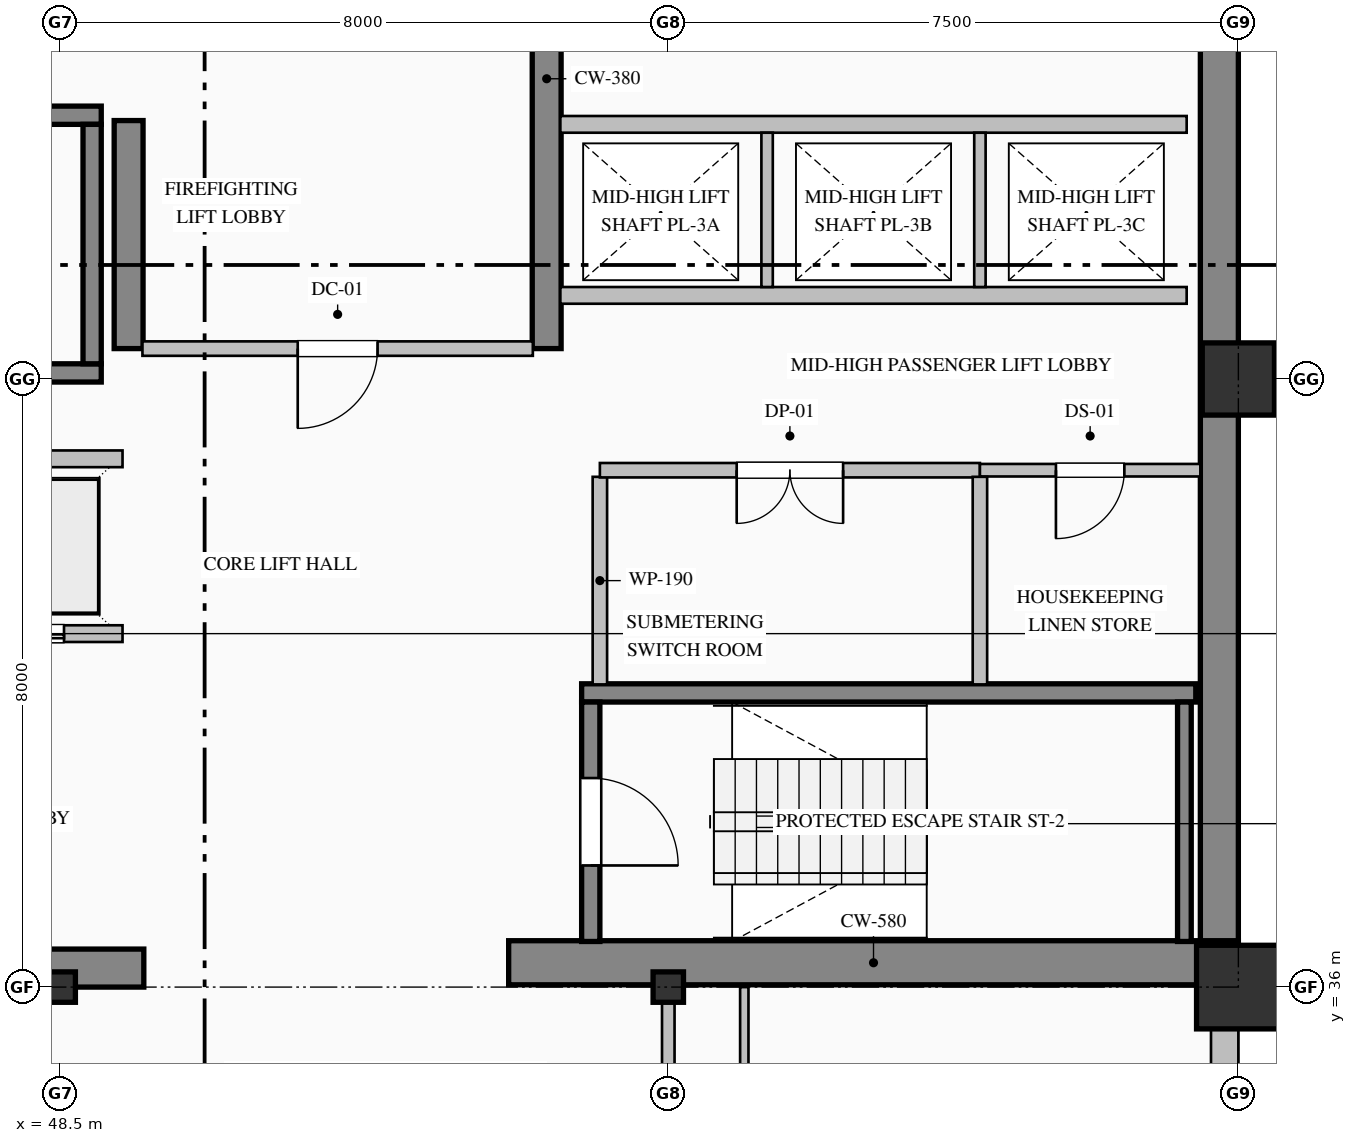
"""IFC4 building model, lengths in metres.
Left out: names, types, materials, properties, quantities, classifications, styles, units other than length and angle.
Written with IfcOpenShell. Run it as: python <this file> out.ifc"""

import sys

from ifc_helpers import new_model, si_unit, direction, frame, frame_2d, origin, origin_2d, place, context, subcontext, project, spatial, rectangle, hollow_rectangle, i_section, extrude, element, fill, save


model = new_model("IFC4")
c1 = context("Model", 3, precision=1e-05, world=origin(), true_north=direction((0.0, 1.0)))
c2 = subcontext(c1, "Body", "Model", "MODEL_VIEW")
j1 = project(units=[si_unit("LENGTHUNIT", "METRE"), si_unit("PLANEANGLEUNIT", "RADIAN")], contexts=[c1])
p1 = place(None, origin())
s1 = spatial("IfcSite", under=j1, at=p1, CompositionType="ELEMENT")
p2 = place(p1, origin())
s2 = spatial("IfcBuilding", under=s1, at=p2, CompositionType="ELEMENT")
p3 = place(p2, frame((0.0, 0.0, 163.0)))
s3 = spatial("IfcBuildingStorey", under=s2, at=p3, CompositionType="ELEMENT", Elevation=163.0)
p4 = place(p3, frame((63.75, 36.32, 0.0), z_axis=(0.0, 0.0, 1.0), x_axis=(0.0, 1.0, 0.0)))
e1 = element("IfcWall", 1, at=p4, inside=s3, PredefinedType="SHEAR", context=c2, shape_type="SweptSolid", body=[
    extrude(rectangle(XDim=15.18, YDim=0.5, at=frame_2d((7.59, 0.0))), origin(), (0.0, 0.0, 1.0), 3.765),
])
p5 = place(p3, frame((40.5, 36.25, 0.0), z_axis=(0.0, 0.0, 1.0), x_axis=(1.0, 0.0, 0.0)))
e2 = element("IfcWall", 2, at=p5, inside=s3, PredefinedType="SHEAR", context=c2, shape_type="SweptSolid", body=[
    extrude(rectangle(XDim=9.1, YDim=0.5, at=frame_2d((4.55, 0.0))), origin(), (0.0, 0.0, 1.0), 3.765),
])
p6 = place(p3, frame((54.4, 36.32, 0.0), z_axis=(0.0, 0.0, 1.0), x_axis=(1.0, 0.0, 0.0)))
e3 = element("IfcWall", 3, at=p6, inside=s3, PredefinedType="SHEAR", context=c2, shape_type="SweptSolid", body=[
    extrude(rectangle(XDim=9.6, YDim=0.58, at=frame_2d((4.8, 0.0))), origin(), (0.0, 0.0, 1.0), 4.0),
])
p7 = place(p3, frame((49.4, 44.4, 0.0), z_axis=(0.0, 0.0, 1.0), x_axis=(0.0, 1.0, 0.0)))
e4 = element("IfcWall", 4, at=p7, inside=s3, PredefinedType="SHEAR", context=c2, shape_type="SweptSolid", body=[
    extrude(rectangle(XDim=3.0, YDim=0.38, at=frame_2d((1.5, 0.0))), origin(), (0.0, 0.0, 1.0), 3.765),
])
p8 = place(p3, frame((54.9, 44.4, 0.0), z_axis=(0.0, 0.0, 1.0), x_axis=(0.0, 1.0, 0.0)))
e5 = element("IfcWall", 5, at=p8, inside=s3, PredefinedType="SHEAR", context=c2, shape_type="SweptSolid", body=[
    extrude(rectangle(XDim=7.1, YDim=0.38, at=frame_2d((3.55, 0.0))), origin(), (0.0, 0.0, 1.0), 3.765),
])
for number, where, z_axis, x_axis in (
    (6, (48.5, 36.0, 0.0), (0.0, 0.0, 1.0), (1.0, 0.0, 0.0)),
    (7, (56.5, 36.0, 0.0), (0.0, 0.0, 1.0), (1.0, 0.0, 0.0)),
):
    element("IfcColumn", number, at=place(p3, frame(where, z_axis=z_axis, x_axis=x_axis)), inside=s3, PredefinedType="COLUMN", context=c2, shape_type="SweptSolid", body=[
        extrude(i_section(OverallWidth=0.4, OverallDepth=0.4, WebThickness=0.013, FlangeThickness=0.021, FilletRadius=0.022, at=origin_2d()), origin(), (0.0, 0.0, 1.0), 4.0),
    ])
p9 = place(p3, frame((64.0, 36.0, 0.0), z_axis=(0.0, 0.0, 1.0), x_axis=(1.0, 0.0, 0.0)))
e8 = element("IfcColumn", 8, at=p9, inside=s3, PredefinedType="COLUMN", context=c2, shape_type="SweptSolid", body=[
    extrude(hollow_rectangle(XDim=1.1, YDim=1.1, WallThickness=0.04, at=origin_2d()), origin(), (0.0, 0.0, 1.0), 4.0),
])
p10 = place(p3, frame((64.0, 44.0, 0.0), z_axis=(0.0, 0.0, 1.0), x_axis=(1.0, 0.0, 0.0)))
e9 = element("IfcColumn", 9, at=p10, inside=s3, PredefinedType="COLUMN", context=c2, shape_type="SweptSolid", body=[
    extrude(hollow_rectangle(XDim=0.95, YDim=0.95, WallThickness=0.036, at=origin_2d()), origin(), (0.0, 0.0, 1.0), 4.0),
])
p11 = place(p3, frame((63.82, 36.05, 0.0), z_axis=(0.0, 0.0, 1.0), x_axis=(0.0, -1.0, 0.0)))
e10 = element("IfcWall", 10, at=p11, inside=s3, PredefinedType="SOLIDWALL", context=c2, shape_type="SweptSolid", body=[
    extrude(rectangle(XDim=28.05, YDim=0.36, at=frame_2d((14.025, 0.0))), origin(), (0.0, 0.0, 1.0), 3.265),
])
p12 = place(p11, frame((2.85, 0.0, 0.85)))
e11 = element("IfcOpeningElement", 11, at=p12, cuts=e10, PredefinedType="OPENING", context=c2, shape_type="SweptSolid", body=[
    extrude(rectangle(XDim=1.5, YDim=1.95, at=frame_2d((0.75, 0.975))), frame((0.0, 0.19, 0.0), z_axis=(0.0, -1.0, 0.0), x_axis=(1.0, 0.0, 0.0)), (0.0, 0.0, 1.0), 0.38),
])
p13 = place(p11, frame((10.2, 0.0, 0.7)))
e12 = element("IfcOpeningElement", 12, at=p13, cuts=e10, PredefinedType="OPENING", context=c2, shape_type="SweptSolid", body=[
    extrude(rectangle(XDim=1.2, YDim=1.85, at=frame_2d((0.6, 0.925))), frame((0.0, 0.19, 0.0), z_axis=(0.0, -1.0, 0.0), x_axis=(1.0, 0.0, 0.0)), (0.0, 0.0, 1.0), 0.38),
])
p14 = place(p11, frame((13.65, 0.0, 0.85)))
e13 = element("IfcOpeningElement", 13, at=p14, cuts=e10, PredefinedType="OPENING", context=c2, shape_type="SweptSolid", body=[
    extrude(rectangle(XDim=1.5, YDim=1.95, at=frame_2d((0.75, 0.975))), frame((0.0, 0.19, 0.0), z_axis=(0.0, -1.0, 0.0), x_axis=(1.0, 0.0, 0.0)), (0.0, 0.0, 1.0), 0.38),
])
p15 = place(p11, frame((24.45, 0.0, 0.85)))
e14 = element("IfcOpeningElement", 14, at=p15, cuts=e10, PredefinedType="OPENING", context=c2, shape_type="SweptSolid", body=[
    extrude(rectangle(XDim=1.5, YDim=1.95, at=frame_2d((0.75, 0.975))), frame((0.0, 0.19, 0.0), z_axis=(0.0, -1.0, 0.0), x_axis=(1.0, 0.0, 0.0)), (0.0, 0.0, 1.0), 0.38),
])
for number, where, z_axis, x_axis in (
    (15, (40.96, 47.47, 0.0), (0.0, 0.0, 1.0), (1.0, 0.0, 0.0)),
    (16, (49.04, 44.08, 0.0), (0.0, 0.0, 1.0), (-1.0, 0.0, 0.0)),
):
    element("IfcWall", number, at=place(p3, frame(where, z_axis=z_axis, x_axis=x_axis)), inside=s3, PredefinedType="SOLIDWALL", context=c2, shape_type="SweptSolid", body=[
        extrude(rectangle(XDim=8.08, YDim=0.24, at=frame_2d((4.04, 0.0))), origin(), (0.0, 0.0, 1.0), 4.0),
    ])
p16 = place(p3, frame((48.92, 44.2, 0.0), z_axis=(0.0, 0.0, 1.0), x_axis=(0.0, 1.0, 0.0)))
e17 = element("IfcWall", 17, at=p16, inside=s3, PredefinedType="SOLIDWALL", context=c2, shape_type="SweptSolid", body=[
    extrude(rectangle(XDim=3.15, YDim=0.24, at=frame_2d((1.575, 0.0))), origin(), (0.0, 0.0, 1.0), 4.0),
])
p17 = place(p3, frame((55.36, 39.87, 0.0), z_axis=(0.0, 0.0, 1.0), x_axis=(1.0, 0.0, 0.0)))
e18 = element("IfcWall", 18, at=p17, inside=s3, PredefinedType="SOLIDWALL", context=c2, shape_type="SweptSolid", body=[
    extrude(rectangle(XDim=8.08, YDim=0.24, at=frame_2d((4.04, 0.0))), origin(), (0.0, 0.0, 1.0), 4.0),
])
p18 = place(p3, frame((55.48, 39.75, 0.0), z_axis=(0.0, 0.0, 1.0), x_axis=(0.0, -1.0, 0.0)))
e19 = element("IfcWall", 19, at=p18, inside=s3, PredefinedType="SOLIDWALL", context=c2, shape_type="SweptSolid", body=[
    extrude(rectangle(XDim=3.15, YDim=0.24, at=frame_2d((1.575, 0.0))), origin(), (0.0, 0.0, 1.0), 4.0),
])
p19 = place(p18, frame((1.0, 0.0, 0.0)))
e20 = element("IfcOpeningElement", 20, at=p19, cuts=e19, PredefinedType="OPENING", context=c2, shape_type="SweptSolid", body=[
    extrude(rectangle(XDim=1.15, YDim=2.2, at=frame_2d((0.575, 1.1))), frame((0.0, 0.13, 0.0), z_axis=(0.0, -1.0, 0.0), x_axis=(1.0, 0.0, 0.0)), (0.0, 0.0, 1.0), 0.26),
])
p20 = place(p3, frame((63.29, 36.6, 0.0), z_axis=(0.0, 0.0, 1.0), x_axis=(0.0, 1.0, 0.0)))
e21 = element("IfcWall", 21, at=p20, inside=s3, PredefinedType="SOLIDWALL", context=c2, shape_type="SweptSolid", body=[
    extrude(rectangle(XDim=3.15, YDim=0.18, at=frame_2d((1.575, 0.0))), origin(), (0.0, 0.0, 1.0), 4.0),
])
p21 = place(p3, frame((49.32, 40.65, 0.0), z_axis=(0.0, 0.0, 1.0), x_axis=(-1.0, 0.0, 0.0)))
e22 = element("IfcWall", 22, at=p21, inside=s3, PredefinedType="PARTITIONING", context=c2, shape_type="SweptSolid", body=[
    extrude(rectangle(XDim=8.24, YDim=0.22, at=frame_2d((4.12, 0.0))), origin(), (0.0, 0.0, 1.0), 3.765),
])
p22 = place(p21, frame((6.37, 0.0, 0.0)))
e23 = element("IfcOpeningElement", 23, at=p22, cuts=e22, PredefinedType="OPENING", context=c2, shape_type="SweptSolid", body=[
    extrude(rectangle(XDim=1.1, YDim=2.2, at=frame_2d((0.55, 1.1))), frame((0.0, 0.12, 0.0), z_axis=(0.0, -1.0, 0.0), x_axis=(1.0, 0.0, 0.0)), (0.0, 0.0, 1.0), 0.24),
])
p23 = place(p21, frame((3.57, 0.0, 0.0)))
e24 = element("IfcOpeningElement", 24, at=p23, cuts=e22, PredefinedType="OPENING", context=c2, shape_type="SweptSolid", body=[
    extrude(rectangle(XDim=1.1, YDim=2.2, at=frame_2d((0.55, 1.1))), frame((0.0, 0.12, 0.0), z_axis=(0.0, -1.0, 0.0), x_axis=(1.0, 0.0, 0.0)), (0.0, 0.0, 1.0), 0.24),
])
p24 = place(p21, frame((0.77, 0.0, 0.0)))
e25 = element("IfcOpeningElement", 25, at=p24, cuts=e22, PredefinedType="OPENING", context=c2, shape_type="SweptSolid", body=[
    extrude(rectangle(XDim=1.1, YDim=2.2, at=frame_2d((0.55, 1.1))), frame((0.0, 0.12, 0.0), z_axis=(0.0, -1.0, 0.0), x_axis=(1.0, 0.0, 0.0)), (0.0, 0.0, 1.0), 0.24),
])
for number, where, z_axis, x_axis in (
    (26, (41.08, 42.95, 0.0), (0.0, 0.0, 1.0), (1.0, 0.0, 0.0)),
    (27, (63.32, 45.1, 0.0), (0.0, 0.0, 1.0), (-1.0, 0.0, 0.0)),
    (28, (55.08, 47.35, 0.0), (0.0, 0.0, 1.0), (1.0, 0.0, 0.0)),
):
    element("IfcWall", number, at=place(p3, frame(where, z_axis=z_axis, x_axis=x_axis)), inside=s3, PredefinedType="PARTITIONING", context=c2, shape_type="SweptSolid", body=[
        extrude(rectangle(XDim=8.24, YDim=0.22, at=frame_2d((4.12, 0.0))), origin(), (0.0, 0.0, 1.0), 3.765),
    ])
for number, where, z_axis, x_axis in (
    (29, (57.8, 45.21, 0.0), (0.0, 0.0, 1.0), (0.0, 1.0, 0.0)),
    (30, (60.6, 45.21, 0.0), (0.0, 0.0, 1.0), (0.0, 1.0, 0.0)),
):
    element("IfcWall", number, at=place(p3, frame(where, z_axis=z_axis, x_axis=x_axis)), inside=s3, PredefinedType="PARTITIONING", context=c2, shape_type="SweptSolid", body=[
        extrude(rectangle(XDim=2.03, YDim=0.15, at=frame_2d((1.015, 0.0))), origin(), (0.0, 0.0, 1.0), 3.765),
    ])
p25 = place(p3, frame((54.718, 44.4, 0.0), z_axis=(0.0, 0.0, 1.0), x_axis=(-1.0, 0.0, 0.0)))
e31 = element("IfcWall", 31, at=p25, inside=s3, PredefinedType="PARTITIONING", context=c2, shape_type="SweptSolid", body=[
    extrude(rectangle(XDim=5.136, YDim=0.19, at=frame_2d((2.568, 0.0))), origin(), (0.0, 0.0, 1.0), 3.765),
])
p26 = place(p25, frame((2.043, 0.0, 0.0)))
e32 = element("IfcOpeningElement", 32, at=p26, cuts=e31, PredefinedType="OPENING", context=c2, shape_type="SweptSolid", body=[
    extrude(rectangle(XDim=1.05, YDim=2.15, at=frame_2d((0.525, 1.075))), frame((0.0, 0.105, 0.0), z_axis=(0.0, -1.0, 0.0), x_axis=(1.0, 0.0, 0.0)), (0.0, 0.0, 1.0), 0.21),
])
p27 = place(p3, frame((55.6, 42.713, 0.0), z_axis=(0.0, 0.0, 1.0), x_axis=(0.0, -1.0, 0.0)))
e33 = element("IfcWall", 33, at=p27, inside=s3, PredefinedType="PARTITIONING", context=c2, shape_type="SweptSolid", body=[
    extrude(rectangle(XDim=2.731, YDim=0.19, at=frame_2d((1.365, 0.0))), origin(), (0.0, 0.0, 1.0), 3.765),
])
p28 = place(p3, frame((60.6, 42.8, 0.0), z_axis=(0.0, 0.0, 1.0), x_axis=(-1.0, 0.0, 0.0)))
e34 = element("IfcWall", 34, at=p28, inside=s3, PredefinedType="PARTITIONING", context=c2, shape_type="SweptSolid", body=[
    extrude(rectangle(XDim=5.0, YDim=0.19, at=frame_2d((2.5, 0.0))), origin(), (0.0, 0.0, 1.0), 3.765),
])
p29 = place(p28, frame((1.8, 0.0, 0.0)))
e35 = element("IfcOpeningElement", 35, at=p29, cuts=e34, PredefinedType="OPENING", context=c2, shape_type="SweptSolid", body=[
    extrude(rectangle(XDim=1.4, YDim=2.25, at=frame_2d((0.7, 1.125))), frame((0.0, 0.105, 0.0), z_axis=(0.0, -1.0, 0.0), x_axis=(1.0, 0.0, 0.0)), (0.0, 0.0, 1.0), 0.21),
])
p30 = place(p3, frame((63.5, 42.8, 0.0), z_axis=(0.0, 0.0, 1.0), x_axis=(-1.0, 0.0, 0.0)))
e36 = element("IfcWall", 36, at=p30, inside=s3, PredefinedType="PARTITIONING", context=c2, shape_type="SweptSolid", body=[
    extrude(rectangle(XDim=2.9, YDim=0.165, at=frame_2d((1.45, 0.0))), origin(), (0.0, 0.0, 1.0), 3.765),
])
p31 = place(p30, frame((1.0, 0.0, 0.0)))
e37 = element("IfcOpeningElement", 37, at=p31, cuts=e36, PredefinedType="OPENING", context=c2, shape_type="SweptSolid", body=[
    extrude(rectangle(XDim=0.9, YDim=2.15, at=frame_2d((0.45, 1.075))), frame((0.0, 0.093, 0.0), z_axis=(0.0, -1.0, 0.0), x_axis=(1.0, 0.0, 0.0)), (0.0, 0.0, 1.0), 0.185),
])
p32 = place(p3, frame((60.6, 42.713, 0.0), z_axis=(0.0, 0.0, 1.0), x_axis=(0.0, -1.0, 0.0)))
e38 = element("IfcWall", 38, at=p32, inside=s3, PredefinedType="PARTITIONING", context=c2, shape_type="SweptSolid", body=[
    extrude(rectangle(XDim=2.731, YDim=0.19, at=frame_2d((1.365, 0.0))), origin(), (0.0, 0.0, 1.0), 3.765),
])
p33 = place(p3, frame((56.5, 36.0, 0.0), z_axis=(0.0, 0.0, 1.0), x_axis=(0.0, -1.0, 0.0)))
e39 = element("IfcWall", 39, at=p33, inside=s3, PredefinedType="PARTITIONING", context=c2, shape_type="SweptSolid", body=[
    extrude(rectangle(XDim=2.325, YDim=0.165, at=frame_2d((1.163, 0.0))), origin(), (0.0, 0.0, 1.0), 3.157),
])
p34 = place(p3, frame((57.5, 36.0, 0.0), z_axis=(0.0, 0.0, 1.0), x_axis=(0.0, -1.0, 0.0)))
e40 = element("IfcWall", 40, at=p34, inside=s3, PredefinedType="MOVABLE", context=c2, shape_type="SweptSolid", body=[
    extrude(rectangle(XDim=21.226, YDim=0.11, at=frame_2d((10.613, 0.0))), origin(), (0.0, 0.0, 1.0), 3.765),
])
p35 = place(p19, origin())
e41 = element("IfcDoor", 41, at=p35, inside=s3, OperationType="SINGLE_SWING_RIGHT", PredefinedType="DOOR", context=c2, shape_type="SweptSolid", body=[
    extrude(rectangle(XDim=1.15, YDim=2.2, at=frame_2d((0.575, 1.1))), frame((0.0, 0.025, 0.0), z_axis=(0.0, -1.0, 0.0), x_axis=(1.0, 0.0, 0.0)), (0.0, 0.0, 1.0), 0.05),
])
fill(e20, e41)
p36 = place(p24, origin())
e42 = element("IfcDoor", 42, at=p36, inside=s3, OperationType="DOUBLE_DOOR_SLIDING", PredefinedType="DOOR", context=c2, shape_type="SweptSolid", body=[
    extrude(rectangle(XDim=1.1, YDim=2.2, at=frame_2d((0.55, 1.1))), frame((0.0, 0.025, 0.0), z_axis=(0.0, -1.0, 0.0), x_axis=(1.0, 0.0, 0.0)), (0.0, 0.0, 1.0), 0.05),
])
fill(e25, e42)
p37 = place(p26, origin())
e43 = element("IfcDoor", 43, at=p37, inside=s3, OperationType="SINGLE_SWING_RIGHT", PredefinedType="DOOR", context=c2, shape_type="SweptSolid", body=[
    extrude(rectangle(XDim=1.05, YDim=2.15, at=frame_2d((0.525, 1.075))), frame((0.0, 0.025, 0.0), z_axis=(0.0, -1.0, 0.0), x_axis=(1.0, 0.0, 0.0)), (0.0, 0.0, 1.0), 0.05),
])
fill(e32, e43)
p38 = place(p29, origin())
e44 = element("IfcDoor", 44, at=p38, inside=s3, OperationType="DOUBLE_DOOR_SINGLE_SWING", PredefinedType="DOOR", context=c2, shape_type="SweptSolid", body=[
    extrude(rectangle(XDim=1.4, YDim=2.25, at=frame_2d((0.7, 1.125))), frame((0.0, 0.025, 0.0), z_axis=(0.0, -1.0, 0.0), x_axis=(1.0, 0.0, 0.0)), (0.0, 0.0, 1.0), 0.05),
])
fill(e35, e44)
p39 = place(p31, origin())
e45 = element("IfcDoor", 45, at=p39, inside=s3, OperationType="SINGLE_SWING_RIGHT", PredefinedType="DOOR", context=c2, shape_type="SweptSolid", body=[
    extrude(rectangle(XDim=0.9, YDim=2.15, at=frame_2d((0.45, 1.075))), frame((0.0, 0.025, 0.0), z_axis=(0.0, -1.0, 0.0), x_axis=(1.0, 0.0, 0.0)), (0.0, 0.0, 1.0), 0.05),
])
fill(e37, e45)
save(model, sys.argv[1])
